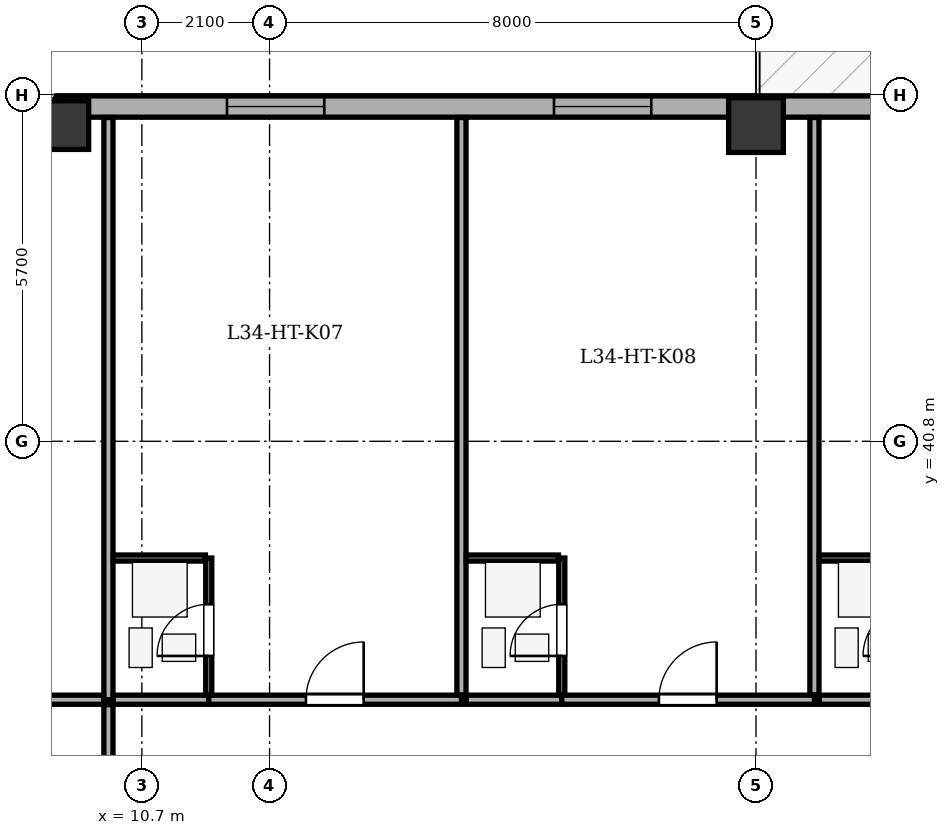
"""IFC4 building model, lengths in metres.
Left out: names, types, materials, properties, quantities, classifications, styles, units other than length and angle.
Written with IfcOpenShell. Run it as: python <this file> out.ifc"""

import sys

from ifc_helpers import new_model, si_unit, direction, frame, frame_2d, origin, origin_2d, place, context, subcontext, project, spatial, rectangle, extrude, element, fill, save


model = new_model("IFC4")
c1 = context("Model", 3, precision=1e-05, world=origin(), true_north=direction((0.0, 1.0)))
c2 = subcontext(c1, "Body", "Model", "MODEL_VIEW")
j1 = project(units=[si_unit("LENGTHUNIT", "METRE"), si_unit("PLANEANGLEUNIT", "RADIAN")], contexts=[c1])
p1 = place(None, origin())
s1 = spatial("IfcSite", under=j1, at=p1, CompositionType="ELEMENT")
p2 = place(p1, origin())
s2 = spatial("IfcBuilding", under=s1, at=p2, CompositionType="ELEMENT")
p3 = place(p2, frame((0.0, 0.0, 137.8)))
s3 = spatial("IfcBuildingStorey", under=s2, at=p3, CompositionType="ELEMENT", Elevation=137.8)
p4 = place(p3, frame((9.3, 46.0, 0.0), z_axis=(0.0, 0.0, 1.0), x_axis=(1.0, 0.0, 0.0)))
e1 = element("IfcColumn", 1, at=p4, inside=s3, PredefinedType="COLUMN", context=c2, shape_type="SweptSolid", body=[
    extrude(rectangle(XDim=0.8, YDim=1.05, at=origin_2d()), origin(), (0.0, 0.0, 1.0), 3.5),
])
p5 = place(p3, frame((20.8, 46.0, 0.0), z_axis=(0.0, 0.0, 1.0), x_axis=(1.0, 0.0, 0.0)))
e2 = element("IfcColumn", 2, at=p5, inside=s3, PredefinedType="COLUMN", context=c2, shape_type="SweptSolid", body=[
    extrude(rectangle(XDim=0.9, YDim=0.9, at=origin_2d()), origin(), (0.0, 0.0, 1.0), 3.5),
])
p6 = place(p3, frame((4.495, 41.5, 0.0), z_axis=(0.0, 0.0, 1.0), x_axis=(0.707106781187, 0.707106781187, 0.0)))
e3 = element("IfcWall", 3, at=p6, inside=s3, PredefinedType="STANDARD", context=c2, shape_type="SweptSolid", body=[
    extrude(rectangle(XDim=6.795, YDim=0.35, at=frame_2d((3.397, 0.0))), origin(), (0.0, 0.0, 1.0), 2.435),
])
p7 = place(p6, frame((2.698, 0.0, 0.75)))
e4 = element("IfcOpeningElement", 4, at=p7, cuts=e3, PredefinedType="OPENING", context=c2, shape_type="SweptSolid", body=[
    extrude(rectangle(XDim=1.4, YDim=1.565, at=frame_2d((0.7, 0.782))), frame((0.0, 0.185, 0.0), z_axis=(0.0, -1.0, 0.0), x_axis=(1.0, 0.0, 0.0)), (0.0, 0.0, 1.0), 0.37),
])
p8 = place(p3, frame((9.3, 46.305, 0.0), z_axis=(0.0, 0.0, 1.0), x_axis=(1.0, 0.0, 0.0)))
e5 = element("IfcWall", 5, at=p8, inside=s3, PredefinedType="STANDARD", context=c2, shape_type="SweptSolid", body=[
    extrude(rectangle(XDim=35.0, YDim=0.35, at=frame_2d((17.5, 0.0))), origin(), (0.0, 0.0, 1.0), 2.435),
])
p9 = place(p8, frame((14.4, 0.0, 0.0)))
e6 = element("IfcOpeningElement", 6, at=p9, cuts=e5, PredefinedType="OPENING", context=c2, shape_type="SweptSolid", body=[
    extrude(rectangle(XDim=1.0, YDim=2.02, at=frame_2d((0.5, 1.01))), frame((0.0, 0.185, 0.0), z_axis=(0.0, -1.0, 0.0), x_axis=(1.0, 0.0, 0.0)), (0.0, 0.0, 1.0), 0.37),
])
p10 = place(p8, frame((2.8, 0.0, 0.75)))
e7 = element("IfcOpeningElement", 7, at=p10, cuts=e5, PredefinedType="OPENING", context=c2, shape_type="SweptSolid", body=[
    extrude(rectangle(XDim=1.6, YDim=1.565, at=frame_2d((0.8, 0.782))), frame((0.0, 0.185, 0.0), z_axis=(0.0, -1.0, 0.0), x_axis=(1.0, 0.0, 0.0)), (0.0, 0.0, 1.0), 0.37),
])
p11 = place(p8, frame((8.178, 0.0, 0.75)))
e8 = element("IfcOpeningElement", 8, at=p11, cuts=e5, PredefinedType="OPENING", context=c2, shape_type="SweptSolid", body=[
    extrude(rectangle(XDim=1.6, YDim=1.565, at=frame_2d((0.8, 0.782))), frame((0.0, 0.185, 0.0), z_axis=(0.0, -1.0, 0.0), x_axis=(1.0, 0.0, 0.0)), (0.0, 0.0, 1.0), 0.37),
])
p12 = place(p8, frame((20.686, 0.0, 0.75)))
e9 = element("IfcOpeningElement", 9, at=p12, cuts=e5, PredefinedType="OPENING", context=c2, shape_type="SweptSolid", body=[
    extrude(rectangle(XDim=1.6, YDim=1.565, at=frame_2d((0.8, 0.782))), frame((0.0, 0.185, 0.0), z_axis=(0.0, -1.0, 0.0), x_axis=(1.0, 0.0, 0.0)), (0.0, 0.0, 1.0), 0.37),
])
p13 = place(p8, frame((27.143, 0.0, 0.75)))
e10 = element("IfcOpeningElement", 10, at=p13, cuts=e5, PredefinedType="OPENING", context=c2, shape_type="SweptSolid", body=[
    extrude(rectangle(XDim=1.35, YDim=1.565, at=frame_2d((0.675, 0.782))), frame((0.0, 0.185, 0.0), z_axis=(0.0, -1.0, 0.0), x_axis=(1.0, 0.0, 0.0)), (0.0, 0.0, 1.0), 0.37),
])
p14 = place(p8, frame((31.33, 0.0, 0.75)))
e11 = element("IfcOpeningElement", 11, at=p14, cuts=e5, PredefinedType="OPENING", context=c2, shape_type="SweptSolid", body=[
    extrude(rectangle(XDim=1.6, YDim=1.565, at=frame_2d((0.8, 0.782))), frame((0.0, 0.185, 0.0), z_axis=(0.0, -1.0, 0.0), x_axis=(1.0, 0.0, 0.0)), (0.0, 0.0, 1.0), 0.37),
])
p15 = place(p3, frame((10.15, 36.55, 0.0), z_axis=(0.0, 0.0, 1.0), x_axis=(0.0, 1.0, 0.0)))
e12 = element("IfcWall", 12, at=p15, inside=s3, PredefinedType="PARTITIONING", context=c2, shape_type="SweptSolid", body=[
    extrude(rectangle(XDim=9.575, YDim=0.15, at=frame_2d((4.788, 0.0))), origin(), (0.0, 0.0, 1.0), 3.05),
])
p16 = place(p3, frame((10.23, 36.55, 0.0), z_axis=(0.0, 0.0, 1.0), x_axis=(1.0, 0.0, 0.0)))
e13 = element("IfcWall", 13, at=p16, inside=s3, PredefinedType="PARTITIONING", context=c2, shape_type="SweptSolid", body=[
    extrude(rectangle(XDim=1.57, YDim=0.15, at=frame_2d((0.785, 0.0))), origin(), (0.0, 0.0, 1.0), 3.05),
])
p17 = place(p3, frame((11.8, 36.55, 0.0), z_axis=(0.0, 0.0, 1.0), x_axis=(1.0, 0.0, 0.0)))
e14 = element("IfcWall", 14, at=p17, inside=s3, PredefinedType="PARTITIONING", context=c2, shape_type="SweptSolid", body=[
    extrude(rectangle(XDim=4.156, YDim=0.15, at=frame_2d((2.078, 0.0))), origin(), (0.0, 0.0, 1.0), 3.05),
])
p18 = place(p17, frame((1.598, 0.0, 0.0)))
e15 = element("IfcOpeningElement", 15, at=p18, cuts=e14, PredefinedType="OPENING", context=c2, shape_type="SweptSolid", body=[
    extrude(rectangle(XDim=0.95, YDim=2.1, at=frame_2d((0.475, 1.05))), frame((0.0, 0.085, 0.0), z_axis=(0.0, -1.0, 0.0), x_axis=(1.0, 0.0, 0.0)), (0.0, 0.0, 1.0), 0.17),
])
p19 = place(p3, frame((11.8, 36.63, 0.0), z_axis=(0.0, 0.0, 1.0), x_axis=(0.0, 1.0, 0.0)))
e16 = element("IfcWall", 16, at=p19, inside=s3, PredefinedType="PARTITIONING", context=c2, shape_type="SweptSolid", body=[
    extrude(rectangle(XDim=2.25, YDim=0.1, at=frame_2d((1.125, 0.0))), origin(), (0.0, 0.0, 1.0), 3.05),
])
p20 = place(p19, frame((0.64, 0.0, 0.0)))
e17 = element("IfcOpeningElement", 17, at=p20, cuts=e16, PredefinedType="OPENING", context=c2, shape_type="SweptSolid", body=[
    extrude(rectangle(XDim=0.85, YDim=2.05, at=frame_2d((0.425, 1.025))), frame((0.0, 0.06, 0.0), z_axis=(0.0, -1.0, 0.0), x_axis=(1.0, 0.0, 0.0)), (0.0, 0.0, 1.0), 0.12),
])
p21 = place(p3, frame((10.23, 38.88, 0.0), z_axis=(0.0, 0.0, 1.0), x_axis=(1.0, 0.0, 0.0)))
e18 = element("IfcWall", 18, at=p21, inside=s3, PredefinedType="PARTITIONING", context=c2, shape_type="SweptSolid", body=[
    extrude(rectangle(XDim=1.515, YDim=0.1, at=frame_2d((0.758, 0.0))), origin(), (0.0, 0.0, 1.0), 3.05),
])
p22 = place(p3, frame((15.956, 36.63, 0.0), z_axis=(0.0, 0.0, 1.0), x_axis=(0.0, 1.0, 0.0)))
e19 = element("IfcWall", 19, at=p22, inside=s3, PredefinedType="PARTITIONING", context=c2, shape_type="SweptSolid", body=[
    extrude(rectangle(XDim=9.495, YDim=0.15, at=frame_2d((4.748, 0.0))), origin(), (0.0, 0.0, 1.0), 2.235),
])
p23 = place(p3, frame((16.036, 36.55, 0.0), z_axis=(0.0, 0.0, 1.0), x_axis=(1.0, 0.0, 0.0)))
e20 = element("IfcWall", 20, at=p23, inside=s3, PredefinedType="PARTITIONING", context=c2, shape_type="SweptSolid", body=[
    extrude(rectangle(XDim=1.57, YDim=0.15, at=frame_2d((0.785, 0.0))), origin(), (0.0, 0.0, 1.0), 3.05),
])
p24 = place(p3, frame((17.606, 36.55, 0.0), z_axis=(0.0, 0.0, 1.0), x_axis=(1.0, 0.0, 0.0)))
e21 = element("IfcWall", 21, at=p24, inside=s3, PredefinedType="PARTITIONING", context=c2, shape_type="SweptSolid", body=[
    extrude(rectangle(XDim=4.155, YDim=0.15, at=frame_2d((2.078, 0.0))), origin(), (0.0, 0.0, 1.0), 3.05),
])
p25 = place(p24, frame((1.597, 0.0, 0.0)))
e22 = element("IfcOpeningElement", 22, at=p25, cuts=e21, PredefinedType="OPENING", context=c2, shape_type="SweptSolid", body=[
    extrude(rectangle(XDim=0.95, YDim=2.1, at=frame_2d((0.475, 1.05))), frame((0.0, 0.085, 0.0), z_axis=(0.0, -1.0, 0.0), x_axis=(1.0, 0.0, 0.0)), (0.0, 0.0, 1.0), 0.17),
])
p26 = place(p3, frame((17.606, 36.63, 0.0), z_axis=(0.0, 0.0, 1.0), x_axis=(0.0, 1.0, 0.0)))
e23 = element("IfcWall", 23, at=p26, inside=s3, PredefinedType="PARTITIONING", context=c2, shape_type="SweptSolid", body=[
    extrude(rectangle(XDim=2.25, YDim=0.1, at=frame_2d((1.125, 0.0))), origin(), (0.0, 0.0, 1.0), 3.05),
])
p27 = place(p26, frame((0.64, 0.0, 0.0)))
e24 = element("IfcOpeningElement", 24, at=p27, cuts=e23, PredefinedType="OPENING", context=c2, shape_type="SweptSolid", body=[
    extrude(rectangle(XDim=0.85, YDim=2.05, at=frame_2d((0.425, 1.025))), frame((0.0, 0.06, 0.0), z_axis=(0.0, -1.0, 0.0), x_axis=(1.0, 0.0, 0.0)), (0.0, 0.0, 1.0), 0.12),
])
p28 = place(p3, frame((16.036, 38.88, 0.0), z_axis=(0.0, 0.0, 1.0), x_axis=(1.0, 0.0, 0.0)))
e25 = element("IfcWall", 25, at=p28, inside=s3, PredefinedType="PARTITIONING", context=c2, shape_type="SweptSolid", body=[
    extrude(rectangle(XDim=1.515, YDim=0.1, at=frame_2d((0.758, 0.0))), origin(), (0.0, 0.0, 1.0), 3.05),
])
p29 = place(p3, frame((21.761, 36.63, 0.0), z_axis=(0.0, 0.0, 1.0), x_axis=(0.0, 1.0, 0.0)))
e26 = element("IfcWall", 26, at=p29, inside=s3, PredefinedType="PARTITIONING", context=c2, shape_type="SweptSolid", body=[
    extrude(rectangle(XDim=9.495, YDim=0.15, at=frame_2d((4.748, 0.0))), origin(), (0.0, 0.0, 1.0), 3.05),
])
p30 = place(p3, frame((21.841, 36.55, 0.0), z_axis=(0.0, 0.0, 1.0), x_axis=(1.0, 0.0, 0.0)))
e27 = element("IfcWall", 27, at=p30, inside=s3, PredefinedType="PARTITIONING", context=c2, shape_type="SweptSolid", body=[
    extrude(rectangle(XDim=1.57, YDim=0.15, at=frame_2d((0.785, 0.0))), origin(), (0.0, 0.0, 1.0), 3.05),
])
p31 = place(p3, frame((21.841, 38.88, 0.0), z_axis=(0.0, 0.0, 1.0), x_axis=(1.0, 0.0, 0.0)))
e28 = element("IfcWall", 28, at=p31, inside=s3, PredefinedType="PARTITIONING", context=c2, shape_type="SweptSolid", body=[
    extrude(rectangle(XDim=1.515, YDim=0.1, at=frame_2d((0.757, 0.0))), origin(), (0.0, 0.0, 1.0), 3.05),
])
p32 = place(p3, frame((4.675, 36.55, 0.0), z_axis=(0.0, 0.0, 1.0), x_axis=(1.0, 0.0, 0.0)))
e29 = element("IfcWall", 29, at=p32, inside=s3, PredefinedType="PARTITIONING", context=c2, shape_type="SweptSolid", body=[
    extrude(rectangle(XDim=5.395, YDim=0.15, at=frame_2d((2.698, 0.0))), origin(), (0.0, 0.0, 1.0), 3.05),
])
p33 = place(p3, frame((10.15, 27.28, 0.0), z_axis=(0.0, 0.0, 1.0), x_axis=(0.0, 1.0, 0.0)))
e30 = element("IfcWall", 30, at=p33, inside=s3, PredefinedType="PARTITIONING", context=c2, shape_type="SweptSolid", body=[
    extrude(rectangle(XDim=9.19, YDim=0.15, at=frame_2d((4.595, 0.0))), origin(), (0.0, 0.0, 1.0), 3.05),
])
p34 = place(p33, frame((4.115, 0.0, 0.0)))
e31 = element("IfcOpeningElement", 31, at=p34, cuts=e30, PredefinedType="OPENING", context=c2, shape_type="SweptSolid", body=[
    extrude(rectangle(XDim=0.95, YDim=2.1, at=frame_2d((0.475, 1.05))), frame((0.0, 0.085, 0.0), z_axis=(0.0, -1.0, 0.0), x_axis=(1.0, 0.0, 0.0)), (0.0, 0.0, 1.0), 0.17),
])
p35 = place(p10, origin())
e32 = element("IfcWindow", 32, at=p35, inside=s3, PartitioningType="SINGLE_PANEL", PredefinedType="WINDOW", context=c2, shape_type="SweptSolid", body=[
    extrude(rectangle(XDim=1.6, YDim=1.565, at=frame_2d((0.8, 0.782))), frame((0.0, -0.01, 0.0), z_axis=(0.0, -1.0, 0.0), x_axis=(1.0, 0.0, 0.0)), (0.0, 0.0, 1.0), 0.06),
])
fill(e7, e32)
p36 = place(p11, origin())
e33 = element("IfcWindow", 33, at=p36, inside=s3, PartitioningType="SINGLE_PANEL", PredefinedType="WINDOW", context=c2, shape_type="SweptSolid", body=[
    extrude(rectangle(XDim=1.6, YDim=1.565, at=frame_2d((0.8, 0.782))), frame((0.0, -0.01, 0.0), z_axis=(0.0, -1.0, 0.0), x_axis=(1.0, 0.0, 0.0)), (0.0, 0.0, 1.0), 0.06),
])
fill(e8, e33)
p37 = place(p20, origin())
e34 = element("IfcDoor", 34, at=p37, inside=s3, OperationType="SINGLE_SWING_LEFT", PredefinedType="DOOR", context=c2, shape_type="SweptSolid", body=[
    extrude(rectangle(XDim=0.85, YDim=2.05, at=frame_2d((0.425, 1.025))), frame((0.0, 0.025, 0.0), z_axis=(0.0, -1.0, 0.0), x_axis=(1.0, 0.0, 0.0)), (0.0, 0.0, 1.0), 0.05),
])
fill(e17, e34)
p38 = place(p18, origin())
e35 = element("IfcDoor", 35, at=p38, inside=s3, OperationType="SINGLE_SWING_RIGHT", PredefinedType="DOOR", context=c2, shape_type="SweptSolid", body=[
    extrude(rectangle(XDim=0.95, YDim=2.1, at=frame_2d((0.475, 1.05))), frame((0.0, 0.025, 0.0), z_axis=(0.0, -1.0, 0.0), x_axis=(1.0, 0.0, 0.0)), (0.0, 0.0, 1.0), 0.05),
])
fill(e15, e35)
p39 = place(p27, origin())
e36 = element("IfcDoor", 36, at=p39, inside=s3, OperationType="SINGLE_SWING_LEFT", PredefinedType="DOOR", context=c2, shape_type="SweptSolid", body=[
    extrude(rectangle(XDim=0.85, YDim=2.05, at=frame_2d((0.425, 1.025))), frame((0.0, 0.025, 0.0), z_axis=(0.0, -1.0, 0.0), x_axis=(1.0, 0.0, 0.0)), (0.0, 0.0, 1.0), 0.05),
])
fill(e24, e36)
p40 = place(p25, origin())
e37 = element("IfcDoor", 37, at=p40, inside=s3, OperationType="SINGLE_SWING_RIGHT", PredefinedType="DOOR", context=c2, shape_type="SweptSolid", body=[
    extrude(rectangle(XDim=0.95, YDim=2.1, at=frame_2d((0.475, 1.05))), frame((0.0, 0.025, 0.0), z_axis=(0.0, -1.0, 0.0), x_axis=(1.0, 0.0, 0.0)), (0.0, 0.0, 1.0), 0.05),
])
fill(e22, e37)
save(model, sys.argv[1])
